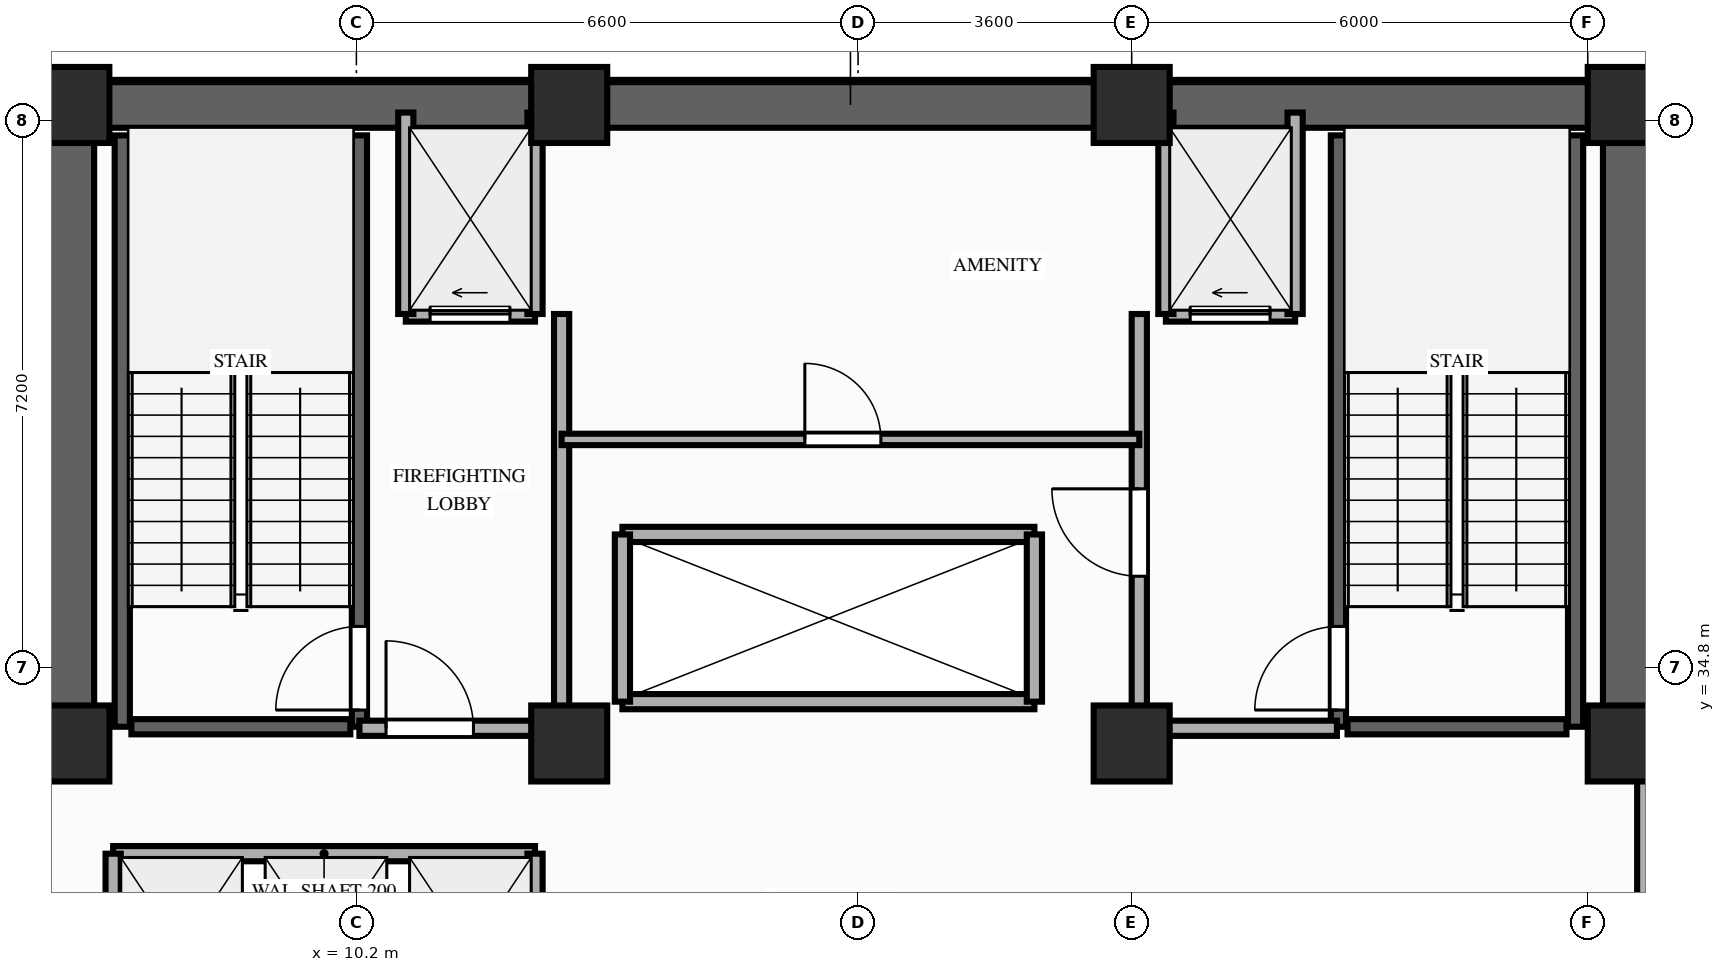
"""IFC4 building model, lengths in metres.
Left out: names, types, materials, properties, quantities, classifications, styles, units other than length and angle.
Written with IfcOpenShell. Run it as: python <this file> out.ifc"""

import sys

from ifc_helpers import new_model, si_unit, direction, frame, frame_2d, origin, origin_2d, place, context, subcontext, project, spatial, rectangle, extrude, element, fill, save


model = new_model("IFC4")
c1 = context("Model", 3, precision=1e-05, world=origin(), true_north=direction((0.0, 1.0)))
c2 = subcontext(c1, "Body", "Model", "MODEL_VIEW")
j1 = project(units=[si_unit("LENGTHUNIT", "METRE"), si_unit("PLANEANGLEUNIT", "RADIAN")], contexts=[c1])
p1 = place(None, origin())
s1 = spatial("IfcSite", under=j1, at=p1, CompositionType="ELEMENT")
p2 = place(p1, origin())
s2 = spatial("IfcBuilding", under=s1, at=p2, CompositionType="ELEMENT")
p3 = place(p2, frame((0.0, 0.0, 156.0)))
s3 = spatial("IfcBuildingStorey", under=s2, at=p3, CompositionType="ELEMENT", Elevation=156.0)
for number, where, z_axis, x_axis in (
    (1, (6.45, 33.8, 0.0), (0.0, 0.0, 1.0), (1.0, 0.0, 0.0)),
    (2, (13.0, 33.8, 0.0), (0.0, 0.0, 1.0), (1.0, 0.0, 0.0)),
    (3, (20.4, 33.8, 0.0), (0.0, 0.0, 1.0), (1.0, 0.0, 0.0)),
    (4, (26.9, 33.8, 0.0), (0.0, 0.0, 1.0), (1.0, 0.0, 0.0)),
    (5, (6.45, 42.2, 0.0), (0.0, 0.0, 1.0), (1.0, 0.0, 0.0)),
    (6, (13.0, 42.2, 0.0), (0.0, 0.0, 1.0), (1.0, 0.0, 0.0)),
    (7, (20.4, 42.2, 0.0), (0.0, 0.0, 1.0), (1.0, 0.0, 0.0)),
    (8, (26.9, 42.2, 0.0), (0.0, 0.0, 1.0), (1.0, 0.0, 0.0)),
):
    element("IfcColumn", number, at=place(p3, frame(where, z_axis=z_axis, x_axis=x_axis)), inside=s3, PredefinedType="COLUMN", context=c2, shape_type="SweptSolid", body=[
        extrude(rectangle(XDim=1.0, YDim=1.0, at=origin_2d()), origin(), (0.0, 0.0, 1.0), 4.0),
    ])
p4 = place(p3, frame((6.45, 42.2, 0.0), z_axis=(0.0, 0.0, 1.0), x_axis=(1.0, 0.0, 0.0)))
e9 = element("IfcWall", 9, at=p4, inside=s3, PredefinedType="SHEAR", context=c2, shape_type="SweptSolid", body=[
    extrude(rectangle(XDim=20.45, YDim=0.6, at=frame_2d((10.225, 0.0))), origin(), (0.0, 0.0, 1.0), 3.82),
])
for number, where, z_axis, x_axis in (
    (10, (6.45, 33.8, 0.0), (0.0, 0.0, 1.0), (0.0, 1.0, 0.0)),
    (11, (26.9, 33.8, 0.0), (0.0, 0.0, 1.0), (0.0, 1.0, 0.0)),
):
    element("IfcWall", number, at=place(p3, frame(where, z_axis=z_axis, x_axis=x_axis)), inside=s3, PredefinedType="SHEAR", context=c2, shape_type="SweptSolid", body=[
        extrude(rectangle(XDim=7.95, YDim=0.6, at=frame_2d((3.975, 0.0))), origin(), (0.0, 0.0, 1.0), 3.82),
    ])
p5 = place(p3, frame((7.12, 34.02, 0.0), z_axis=(0.0, 0.0, 1.0), x_axis=(0.0, 1.0, 0.0)))
e12 = element("IfcWall", 12, at=p5, inside=s3, PredefinedType="SHEAR", context=c2, shape_type="SweptSolid", body=[
    extrude(rectangle(XDim=7.78, YDim=0.2, at=frame_2d((3.89, 0.0))), origin(), (0.0, 0.0, 1.0), 3.82),
])
p6 = place(p3, frame((10.24, 34.02, 0.0), z_axis=(0.0, 0.0, 1.0), x_axis=(0.0, 1.0, 0.0)))
e13 = element("IfcWall", 13, at=p6, inside=s3, PredefinedType="SHEAR", context=c2, shape_type="SweptSolid", body=[
    extrude(rectangle(XDim=7.78, YDim=0.2, at=frame_2d((3.89, 0.0))), origin(), (0.0, 0.0, 1.0), 3.82),
])
p7 = place(p6, frame((0.22, 0.0, 0.0)))
e14 = element("IfcOpeningElement", 14, at=p7, cuts=e13, PredefinedType="OPENING", context=c2, shape_type="SweptSolid", body=[
    extrude(rectangle(XDim=1.1, YDim=2.15, at=frame_2d((0.55, 1.075))), frame((0.0, 0.11, 0.0), z_axis=(0.0, -1.0, 0.0), x_axis=(1.0, 0.0, 0.0)), (0.0, 0.0, 1.0), 0.22),
])
p8 = place(p3, frame((7.24, 34.02, 0.0), z_axis=(0.0, 0.0, 1.0), x_axis=(1.0, 0.0, 0.0)))
e15 = element("IfcWall", 15, at=p8, inside=s3, PredefinedType="SHEAR", context=c2, shape_type="SweptSolid", body=[
    extrude(rectangle(XDim=2.88, YDim=0.2, at=frame_2d((1.44, 0.0))), origin(), (0.0, 0.0, 1.0), 3.82),
])
p9 = place(p3, frame((23.12, 34.02, 0.0), z_axis=(0.0, 0.0, 1.0), x_axis=(0.0, 1.0, 0.0)))
e16 = element("IfcWall", 16, at=p9, inside=s3, PredefinedType="SHEAR", context=c2, shape_type="SweptSolid", body=[
    extrude(rectangle(XDim=7.78, YDim=0.2, at=frame_2d((3.89, 0.0))), origin(), (0.0, 0.0, 1.0), 3.82),
])
p10 = place(p9, frame((0.22, 0.0, 0.0)))
e17 = element("IfcOpeningElement", 17, at=p10, cuts=e16, PredefinedType="OPENING", context=c2, shape_type="SweptSolid", body=[
    extrude(rectangle(XDim=1.1, YDim=2.15, at=frame_2d((0.55, 1.075))), frame((0.0, 0.11, 0.0), z_axis=(0.0, -1.0, 0.0), x_axis=(1.0, 0.0, 0.0)), (0.0, 0.0, 1.0), 0.22),
])
p11 = place(p3, frame((26.24, 34.02, 0.0), z_axis=(0.0, 0.0, 1.0), x_axis=(0.0, 1.0, 0.0)))
e18 = element("IfcWall", 18, at=p11, inside=s3, PredefinedType="SHEAR", context=c2, shape_type="SweptSolid", body=[
    extrude(rectangle(XDim=7.78, YDim=0.2, at=frame_2d((3.89, 0.0))), origin(), (0.0, 0.0, 1.0), 3.82),
])
p12 = place(p3, frame((23.24, 34.02, 0.0), z_axis=(0.0, 0.0, 1.0), x_axis=(1.0, 0.0, 0.0)))
e19 = element("IfcWall", 19, at=p12, inside=s3, PredefinedType="SHEAR", context=c2, shape_type="SweptSolid", body=[
    extrude(rectangle(XDim=2.88, YDim=0.2, at=frame_2d((1.44, 0.0))), origin(), (0.0, 0.0, 1.0), 3.82),
])
p13 = place(p3, frame((7.0, 32.35, 0.0), z_axis=(0.0, 0.0, 1.0), x_axis=(1.0, 0.0, 0.0)))
e20 = element("IfcWall", 20, at=p13, inside=s3, PredefinedType="MOVABLE", context=c2, shape_type="SweptSolid", body=[
    extrude(rectangle(XDim=5.55, YDim=0.2, at=frame_2d((2.775, 0.0))), origin(), (0.0, 0.0, 1.0), 3.82),
])
for number, where, z_axis, x_axis in (
    (21, (7.0, 29.85, 0.0), (0.0, 0.0, 1.0), (0.0, 1.0, 0.0)),
    (22, (12.55, 29.85, 0.0), (0.0, 0.0, 1.0), (0.0, 1.0, 0.0)),
):
    element("IfcWall", number, at=place(p3, frame(where, z_axis=z_axis, x_axis=x_axis)), inside=s3, PredefinedType="MOVABLE", context=c2, shape_type="SweptSolid", body=[
        extrude(rectangle(XDim=2.5, YDim=0.2, at=frame_2d((1.25, 0.0))), origin(), (0.0, 0.0, 1.0), 3.82),
    ])
p14 = place(p3, frame((10.85, 39.45, 0.0), z_axis=(0.0, 0.0, 1.0), x_axis=(1.0, 0.0, 0.0)))
e23 = element("IfcWall", 23, at=p14, inside=s3, PredefinedType="MOVABLE", context=c2, shape_type="SweptSolid", body=[
    extrude(rectangle(XDim=1.7, YDim=0.2, at=frame_2d((0.85, 0.0))), origin(), (0.0, 0.0, 1.0), 3.82),
])
p15 = place(p14, frame((0.32, 0.0, 0.0)))
e24 = element("IfcOpeningElement", 24, at=p15, cuts=e23, PredefinedType="OPENING", context=c2, shape_type="SweptSolid", body=[
    extrude(rectangle(XDim=1.05, YDim=2.15, at=frame_2d((0.525, 1.075))), frame((0.0, 0.11, 0.0), z_axis=(0.0, -1.0, 0.0), x_axis=(1.0, 0.0, 0.0)), (0.0, 0.0, 1.0), 0.22),
])
p16 = place(p3, frame((20.85, 39.45, 0.0), z_axis=(0.0, 0.0, 1.0), x_axis=(1.0, 0.0, 0.0)))
e25 = element("IfcWall", 25, at=p16, inside=s3, PredefinedType="MOVABLE", context=c2, shape_type="SweptSolid", body=[
    extrude(rectangle(XDim=1.7, YDim=0.2, at=frame_2d((0.85, 0.0))), origin(), (0.0, 0.0, 1.0), 3.82),
])
p17 = place(p16, frame((0.32, 0.0, 0.0)))
e26 = element("IfcOpeningElement", 26, at=p17, cuts=e25, PredefinedType="OPENING", context=c2, shape_type="SweptSolid", body=[
    extrude(rectangle(XDim=1.05, YDim=2.15, at=frame_2d((0.525, 1.075))), frame((0.0, 0.11, 0.0), z_axis=(0.0, -1.0, 0.0), x_axis=(1.0, 0.0, 0.0)), (0.0, 0.0, 1.0), 0.22),
])
for number, where, z_axis, x_axis in (
    (27, (10.85, 39.45, 0.0), (0.0, 0.0, 1.0), (0.0, 1.0, 0.0)),
    (28, (12.55, 39.45, 0.0), (0.0, 0.0, 1.0), (0.0, 1.0, 0.0)),
):
    element("IfcWall", number, at=place(p3, frame(where, z_axis=z_axis, x_axis=x_axis)), inside=s3, PredefinedType="MOVABLE", context=c2, shape_type="SweptSolid", body=[
        extrude(rectangle(XDim=2.65, YDim=0.2, at=frame_2d((1.325, 0.0))), origin(), (0.0, 0.0, 1.0), 3.25),
    ])
p18 = place(p3, frame((12.9, 34.0, 0.0), z_axis=(0.0, 0.0, 1.0), x_axis=(0.0, 1.0, 0.0)))
e29 = element("IfcWall", 29, at=p18, inside=s3, PredefinedType="PARTITIONING", context=c2, shape_type="SweptSolid", body=[
    extrude(rectangle(XDim=5.45, YDim=0.2, at=frame_2d((2.725, 0.0))), origin(), (0.0, 0.0, 1.0), 3.25),
])
p19 = place(p3, frame((10.24, 34.0, 0.0), z_axis=(0.0, 0.0, 1.0), x_axis=(1.0, 0.0, 0.0)))
e30 = element("IfcWall", 30, at=p19, inside=s3, PredefinedType="PARTITIONING", context=c2, shape_type="SweptSolid", body=[
    extrude(rectangle(XDim=2.66, YDim=0.2, at=frame_2d((1.33, 0.0))), origin(), (0.0, 0.0, 1.0), 3.25),
])
p20 = place(p19, frame((0.35, 0.0, 0.0)))
e31 = element("IfcOpeningElement", 31, at=p20, cuts=e30, PredefinedType="OPENING", context=c2, shape_type="SweptSolid", body=[
    extrude(rectangle(XDim=1.15, YDim=2.15, at=frame_2d((0.575, 1.075))), frame((0.0, 0.11, 0.0), z_axis=(0.0, -1.0, 0.0), x_axis=(1.0, 0.0, 0.0)), (0.0, 0.0, 1.0), 0.22),
])
for number, where, z_axis, x_axis in (
    (32, (20.85, 39.45, 0.0), (0.0, 0.0, 1.0), (0.0, 1.0, 0.0)),
    (33, (22.55, 39.45, 0.0), (0.0, 0.0, 1.0), (0.0, 1.0, 0.0)),
):
    element("IfcWall", number, at=place(p3, frame(where, z_axis=z_axis, x_axis=x_axis)), inside=s3, PredefinedType="MOVABLE", context=c2, shape_type="SweptSolid", body=[
        extrude(rectangle(XDim=2.65, YDim=0.2, at=frame_2d((1.325, 0.0))), origin(), (0.0, 0.0, 1.0), 3.25),
    ])
p21 = place(p3, frame((20.5, 34.0, 0.0), z_axis=(0.0, 0.0, 1.0), x_axis=(0.0, 1.0, 0.0)))
e34 = element("IfcWall", 34, at=p21, inside=s3, PredefinedType="PARTITIONING", context=c2, shape_type="SweptSolid", body=[
    extrude(rectangle(XDim=5.45, YDim=0.2, at=frame_2d((2.725, 0.0))), origin(), (0.0, 0.0, 1.0), 3.25),
])
p22 = place(p21, frame((2.0, 0.0, 0.0)))
e35 = element("IfcOpeningElement", 35, at=p22, cuts=e34, PredefinedType="OPENING", context=c2, shape_type="SweptSolid", body=[
    extrude(rectangle(XDim=1.15, YDim=2.15, at=frame_2d((0.575, 1.075))), frame((0.0, 0.11, 0.0), z_axis=(0.0, -1.0, 0.0), x_axis=(1.0, 0.0, 0.0)), (0.0, 0.0, 1.0), 0.22),
])
p23 = place(p3, frame((20.5, 34.0, 0.0), z_axis=(0.0, 0.0, 1.0), x_axis=(1.0, 0.0, 0.0)))
e36 = element("IfcWall", 36, at=p23, inside=s3, PredefinedType="PARTITIONING", context=c2, shape_type="SweptSolid", body=[
    extrude(rectangle(XDim=2.6, YDim=0.2, at=frame_2d((1.3, 0.0))), origin(), (0.0, 0.0, 1.0), 3.25),
])
p24 = place(p3, frame((12.9, 37.8, 0.0), z_axis=(0.0, 0.0, 1.0), x_axis=(1.0, 0.0, 0.0)))
e37 = element("IfcWall", 37, at=p24, inside=s3, PredefinedType="PARTITIONING", context=c2, shape_type="SweptSolid", body=[
    extrude(rectangle(XDim=7.6, YDim=0.15, at=frame_2d((3.8, 0.0))), origin(), (0.0, 0.0, 1.0), 3.82),
])
p25 = place(p24, frame((3.2, 0.0, 0.0)))
e38 = element("IfcOpeningElement", 38, at=p25, cuts=e37, PredefinedType="OPENING", context=c2, shape_type="SweptSolid", body=[
    extrude(rectangle(XDim=1.0, YDim=2.15, at=frame_2d((0.5, 1.075))), frame((0.0, 0.085, 0.0), z_axis=(0.0, -1.0, 0.0), x_axis=(1.0, 0.0, 0.0)), (0.0, 0.0, 1.0), 0.17),
])
for number, where, z_axis, x_axis in (
    (39, (13.7, 34.35, 0.0), (0.0, 0.0, 1.0), (1.0, 0.0, 0.0)),
    (40, (13.7, 36.55, 0.0), (0.0, 0.0, 1.0), (1.0, 0.0, 0.0)),
):
    element("IfcWall", number, at=place(p3, frame(where, z_axis=z_axis, x_axis=x_axis)), inside=s3, PredefinedType="MOVABLE", context=c2, shape_type="SweptSolid", body=[
        extrude(rectangle(XDim=5.42, YDim=0.2, at=frame_2d((2.71, 0.0))), origin(), (0.0, 0.0, 1.0), 3.82),
    ])
for number, where, z_axis, x_axis in (
    (41, (13.7, 34.35, 0.0), (0.0, 0.0, 1.0), (0.0, 1.0, 0.0)),
    (42, (19.12, 34.35, 0.0), (0.0, 0.0, 1.0), (0.0, 1.0, 0.0)),
):
    element("IfcWall", number, at=place(p3, frame(where, z_axis=z_axis, x_axis=x_axis)), inside=s3, PredefinedType="MOVABLE", context=c2, shape_type="SweptSolid", body=[
        extrude(rectangle(XDim=2.2, YDim=0.2, at=frame_2d((1.1, 0.0))), origin(), (0.0, 0.0, 1.0), 3.82),
    ])
p26 = place(p3, frame((27.15, 26.75, 0.0), z_axis=(0.0, 0.0, 1.0), x_axis=(0.0, 1.0, 0.0)))
e43 = element("IfcWall", 43, at=p26, inside=s3, PredefinedType="PARTITIONING", context=c2, shape_type="SweptSolid", body=[
    extrude(rectangle(XDim=6.9, YDim=0.2, at=frame_2d((3.45, 0.0))), origin(), (0.0, 0.0, 1.0), 3.25),
])
p27 = place(p26, frame((2.68, 0.0, 0.0)))
e44 = element("IfcOpeningElement", 44, at=p27, cuts=e43, PredefinedType="OPENING", context=c2, shape_type="SweptSolid", body=[
    extrude(rectangle(XDim=1.4, YDim=2.2, at=frame_2d((0.7, 1.1))), frame((0.0, 0.11, 0.0), z_axis=(0.0, -1.0, 0.0), x_axis=(1.0, 0.0, 0.0)), (0.0, 0.0, 1.0), 0.22),
])
p28 = place(p7, origin())
e45 = element("IfcDoor", 45, at=p28, inside=s3, OperationType="SINGLE_SWING_LEFT", PredefinedType="DOOR", context=c2, shape_type="SweptSolid", body=[
    extrude(rectangle(XDim=1.1, YDim=2.15, at=frame_2d((0.55, 1.075))), frame((0.0, 0.025, 0.0), z_axis=(0.0, -1.0, 0.0), x_axis=(1.0, 0.0, 0.0)), (0.0, 0.0, 1.0), 0.05),
])
fill(e14, e45)
p29 = place(p10, origin())
e46 = element("IfcDoor", 46, at=p29, inside=s3, OperationType="SINGLE_SWING_LEFT", PredefinedType="DOOR", context=c2, shape_type="SweptSolid", body=[
    extrude(rectangle(XDim=1.1, YDim=2.15, at=frame_2d((0.55, 1.075))), frame((0.0, 0.025, 0.0), z_axis=(0.0, -1.0, 0.0), x_axis=(1.0, 0.0, 0.0)), (0.0, 0.0, 1.0), 0.05),
])
fill(e17, e46)
p30 = place(p15, origin())
e47 = element("IfcDoor", 47, at=p30, inside=s3, OperationType="SLIDING_TO_LEFT", PredefinedType="DOOR", context=c2, shape_type="SweptSolid", body=[
    extrude(rectangle(XDim=1.05, YDim=2.15, at=frame_2d((0.525, 1.075))), frame((0.0, 0.025, 0.0), z_axis=(0.0, -1.0, 0.0), x_axis=(1.0, 0.0, 0.0)), (0.0, 0.0, 1.0), 0.05),
])
fill(e24, e47)
p31 = place(p17, origin())
e48 = element("IfcDoor", 48, at=p31, inside=s3, OperationType="SLIDING_TO_LEFT", PredefinedType="DOOR", context=c2, shape_type="SweptSolid", body=[
    extrude(rectangle(XDim=1.05, YDim=2.15, at=frame_2d((0.525, 1.075))), frame((0.0, 0.025, 0.0), z_axis=(0.0, -1.0, 0.0), x_axis=(1.0, 0.0, 0.0)), (0.0, 0.0, 1.0), 0.05),
])
fill(e26, e48)
p32 = place(p20, origin())
e49 = element("IfcDoor", 49, at=p32, inside=s3, OperationType="SINGLE_SWING_LEFT", PredefinedType="DOOR", context=c2, shape_type="SweptSolid", body=[
    extrude(rectangle(XDim=1.15, YDim=2.15, at=frame_2d((0.575, 1.075))), frame((0.0, 0.025, 0.0), z_axis=(0.0, -1.0, 0.0), x_axis=(1.0, 0.0, 0.0)), (0.0, 0.0, 1.0), 0.05),
])
fill(e31, e49)
p33 = place(p22, origin())
e50 = element("IfcDoor", 50, at=p33, inside=s3, OperationType="SINGLE_SWING_RIGHT", PredefinedType="DOOR", context=c2, shape_type="SweptSolid", body=[
    extrude(rectangle(XDim=1.15, YDim=2.15, at=frame_2d((0.575, 1.075))), frame((0.0, 0.025, 0.0), z_axis=(0.0, -1.0, 0.0), x_axis=(1.0, 0.0, 0.0)), (0.0, 0.0, 1.0), 0.05),
])
fill(e35, e50)
p34 = place(p25, origin())
e51 = element("IfcDoor", 51, at=p34, inside=s3, OperationType="SINGLE_SWING_LEFT", PredefinedType="DOOR", context=c2, shape_type="SweptSolid", body=[
    extrude(rectangle(XDim=1.0, YDim=2.15, at=frame_2d((0.5, 1.075))), frame((0.0, 0.025, 0.0), z_axis=(0.0, -1.0, 0.0), x_axis=(1.0, 0.0, 0.0)), (0.0, 0.0, 1.0), 0.05),
])
fill(e38, e51)
save(model, sys.argv[1])
